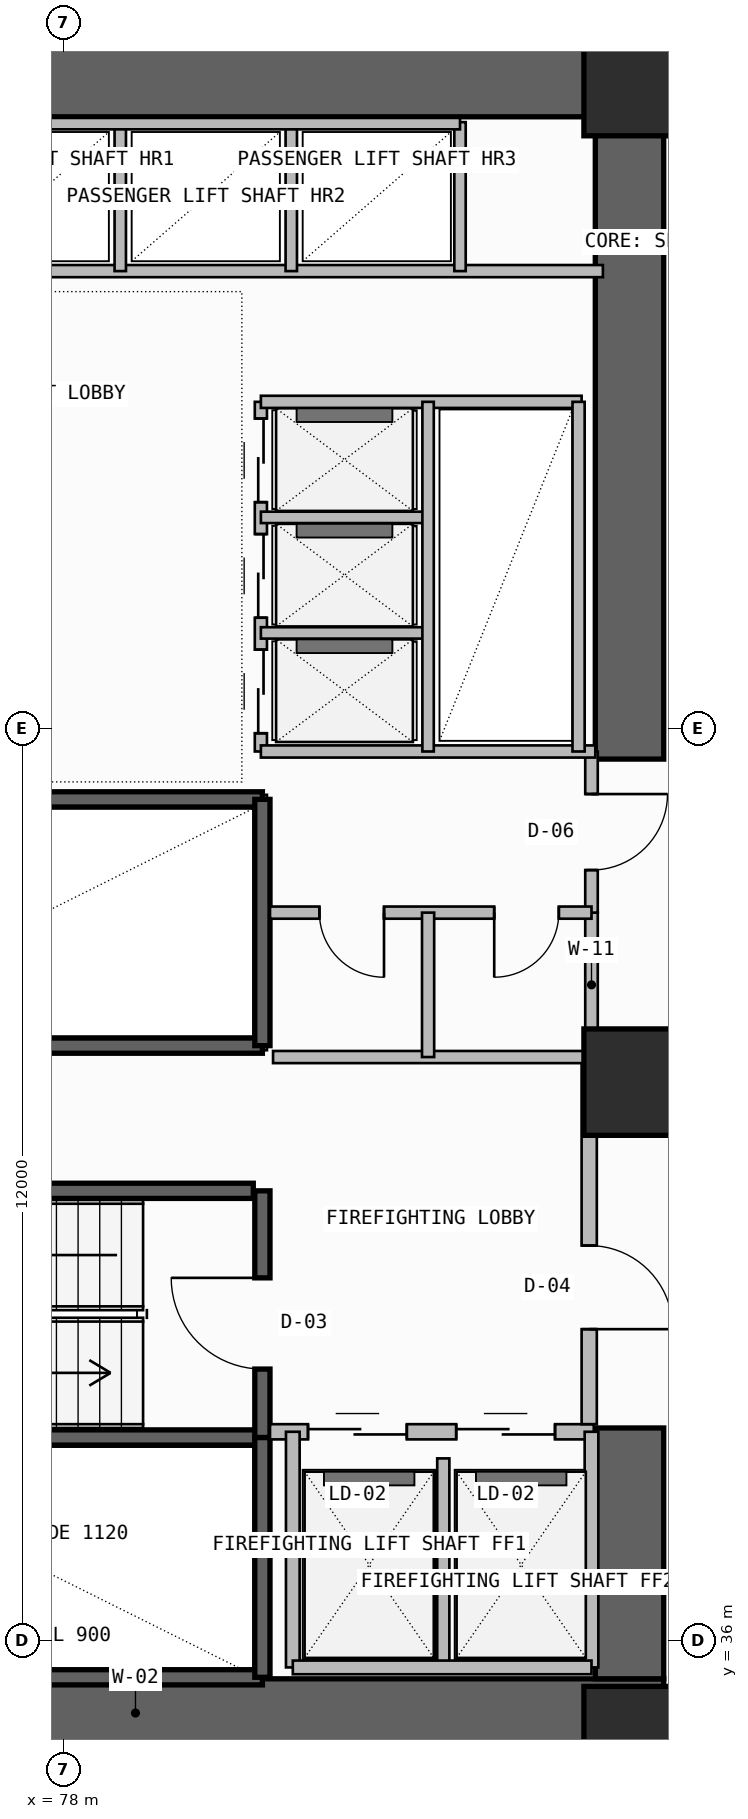
"""IFC4 building model, lengths in metres.
Left out: names, types, materials, properties, quantities, classifications, styles, units other than length and angle.
Written with IfcOpenShell. Run it as: python <this file> out.ifc"""

import sys

from ifc_helpers import new_model, si_unit, direction, frame, frame_2d, origin, origin_2d, place, context, subcontext, project, spatial, rectangle, extrude, element, fill, save


model = new_model("IFC4")
c1 = context("Model", 3, precision=1e-05, world=origin(), true_north=direction((0.0, 1.0)))
c2 = subcontext(c1, "Body", "Model", "MODEL_VIEW")
j1 = project(units=[si_unit("LENGTHUNIT", "METRE"), si_unit("PLANEANGLEUNIT", "RADIAN")], contexts=[c1])
p1 = place(None, origin())
s1 = spatial("IfcSite", under=j1, at=p1, CompositionType="ELEMENT")
p2 = place(p1, origin())
s2 = spatial("IfcBuilding", under=s1, at=p2, CompositionType="ELEMENT")
p3 = place(p2, frame((0.0, 0.0, 110.1)))
s3 = spatial("IfcBuildingStorey", under=s2, at=p3, CompositionType="ELEMENT", Elevation=110.1)
p4 = place(p3, frame((72.0, 35.05, -0.26), z_axis=(0.0, 0.0, 1.0), x_axis=(1.0, 0.0, 0.0)))
e1 = element("IfcWall", 1, at=p4, inside=s3, PredefinedType="SHEAR", context=c2, shape_type="SweptSolid", body=[
    extrude(rectangle(XDim=13.9, YDim=0.9, at=frame_2d((6.95, 0.0))), origin(), (0.0, 0.0, 1.0), 3.6),
])
p5 = place(p3, frame((85.45, 35.5, -0.26), z_axis=(0.0, 0.0, 1.0), x_axis=(0.0, 1.0, 0.0)))
e2 = element("IfcWall", 2, at=p5, inside=s3, PredefinedType="SHEAR", context=c2, shape_type="SweptSolid", body=[
    extrude(rectangle(XDim=3.3, YDim=0.9, at=frame_2d((1.65, 0.0))), origin(), (0.0, 0.0, 1.0), 3.6),
])
p6 = place(p3, frame((72.0, 56.5, -0.26), z_axis=(0.0, 0.0, 1.0), x_axis=(1.0, 0.0, 0.0)))
e3 = element("IfcWall", 3, at=p6, inside=s3, PredefinedType="SHEAR", context=c2, shape_type="SweptSolid", body=[
    extrude(rectangle(XDim=13.9, YDim=0.9, at=frame_2d((6.95, 0.0))), origin(), (0.0, 0.0, 1.0), 3.6),
])
p7 = place(p3, frame((85.45, 47.6, -0.26), z_axis=(0.0, 0.0, 1.0), x_axis=(0.0, 1.0, 0.0)))
e4 = element("IfcWall", 4, at=p7, inside=s3, PredefinedType="SHEAR", context=c2, shape_type="SweptSolid", body=[
    extrude(rectangle(XDim=8.45, YDim=0.9, at=frame_2d((4.225, 0.0))), origin(), (0.0, 0.0, 1.0), 3.6),
])
for number, where, z_axis, x_axis in (
    (5, (85.55, 34.7, 0.0), (0.0, 0.0, 1.0), (1.0, 0.0, 0.0)),
    (6, (85.55, 43.35, 0.0), (0.0, 0.0, 1.0), (1.0, 0.0, 0.0)),
    (7, (85.55, 56.5, 0.0), (0.0, 0.0, 1.0), (1.0, 0.0, 0.0)),
):
    element("IfcColumn", number, at=place(p3, frame(where, z_axis=z_axis, x_axis=x_axis)), inside=s3, PredefinedType="COLUMN", context=c2, shape_type="SweptSolid", body=[
        extrude(rectangle(XDim=1.4, YDim=1.4, at=origin_2d()), origin(), (0.0, 0.0, 1.0), 3.6),
    ])
for number, where, z_axis, x_axis in (
    (8, (72.92, 35.52, -0.26), (0.0, 0.0, 1.0), (1.0, 0.0, 0.0)),
    (9, (72.92, 38.675, -0.26), (0.0, 0.0, 1.0), (1.0, 0.0, 0.0)),
):
    element("IfcWall", number, at=place(p3, frame(where, z_axis=z_axis, x_axis=x_axis)), inside=s3, PredefinedType="SOLIDWALL", context=c2, shape_type="SweptSolid", body=[
        extrude(rectangle(XDim=7.7, YDim=0.2, at=frame_2d((3.85, 0.0))), origin(), (0.0, 0.0, 1.0), 3.6),
    ])
p8 = place(p3, frame((80.62, 35.52, -0.26), z_axis=(0.0, 0.0, 1.0), x_axis=(0.0, 1.0, 0.0)))
e10 = element("IfcWall", 10, at=p8, inside=s3, PredefinedType="SOLIDWALL", context=c2, shape_type="SweptSolid", body=[
    extrude(rectangle(XDim=3.155, YDim=0.2, at=frame_2d((1.578, 0.0))), origin(), (0.0, 0.0, 1.0), 3.6),
])
p9 = place(p3, frame((80.62, 38.675, -0.26), z_axis=(0.0, 0.0, 1.0), x_axis=(0.0, 1.0, 0.0)))
e11 = element("IfcWall", 11, at=p9, inside=s3, PredefinedType="SOLIDWALL", context=c2, shape_type="SweptSolid", body=[
    extrude(rectangle(XDim=3.245, YDim=0.2, at=frame_2d((1.623, 0.0))), origin(), (0.0, 0.0, 1.0), 3.6),
])
p10 = place(p9, frame((0.9, 0.0, 0.26)))
e12 = element("IfcOpeningElement", 12, at=p10, cuts=e11, PredefinedType="OPENING", context=c2, shape_type="SweptSolid", body=[
    extrude(rectangle(XDim=1.2, YDim=2.2, at=frame_2d((0.6, 1.1))), frame((0.0, 0.11, 0.0), z_axis=(0.0, -1.0, 0.0), x_axis=(1.0, 0.0, 0.0)), (0.0, 0.0, 1.0), 0.22),
])
p11 = place(p3, frame((80.72, 38.75, 0.0), z_axis=(0.0, 0.0, 1.0), x_axis=(1.0, 0.0, 0.0)))
e13 = element("IfcWall", 13, at=p11, inside=s3, PredefinedType="SOLIDWALL", context=c2, shape_type="SweptSolid", body=[
    extrude(rectangle(XDim=4.26, YDim=0.2, at=frame_2d((2.13, 0.0))), origin(), (0.0, 0.0, 1.0), 3.34),
])
p12 = place(p11, frame((0.5, 0.0, 0.0)))
e14 = element("IfcOpeningElement", 14, at=p12, cuts=e13, PredefinedType="OPENING", context=c2, shape_type="SweptSolid", body=[
    extrude(rectangle(XDim=1.3, YDim=2.3, at=frame_2d((0.65, 1.15))), frame((0.0, 0.11, 0.0), z_axis=(0.0, -1.0, 0.0), x_axis=(1.0, 0.0, 0.0)), (0.0, 0.0, 1.0), 0.22),
])
p13 = place(p11, frame((2.45, 0.0, 0.0)))
e15 = element("IfcOpeningElement", 15, at=p13, cuts=e13, PredefinedType="OPENING", context=c2, shape_type="SweptSolid", body=[
    extrude(rectangle(XDim=1.3, YDim=2.3, at=frame_2d((0.65, 1.15))), frame((0.0, 0.11, 0.0), z_axis=(0.0, -1.0, 0.0), x_axis=(1.0, 0.0, 0.0)), (0.0, 0.0, 1.0), 0.22),
])
p14 = place(p3, frame((83.0, 35.65, 0.0), z_axis=(0.0, 0.0, 1.0), x_axis=(0.0, 1.0, 0.0)))
e16 = element("IfcWall", 16, at=p14, inside=s3, PredefinedType="PLUMBINGWALL", context=c2, shape_type="SweptSolid", body=[
    extrude(rectangle(XDim=2.75, YDim=0.16, at=frame_2d((1.375, 0.0))), origin(), (0.0, 0.0, 1.0), 3.34),
])
for number, where, z_axis, x_axis in (
    (17, (84.95, 35.65, 0.0), (0.0, 0.0, 1.0), (0.0, 1.0, 0.0)),
    (18, (81.02, 35.65, 0.0), (0.0, 0.0, 1.0), (0.0, 1.0, 0.0)),
):
    element("IfcWall", number, at=place(p3, frame(where, z_axis=z_axis, x_axis=x_axis)), inside=s3, PredefinedType="SOLIDWALL", context=c2, shape_type="SweptSolid", body=[
        extrude(rectangle(XDim=3.1, YDim=0.18, at=frame_2d((1.55, 0.0))), origin(), (0.0, 0.0, 1.0), 3.34),
    ])
p15 = place(p3, frame((81.02, 35.65, 0.0), z_axis=(0.0, 0.0, 1.0), x_axis=(1.0, 0.0, 0.0)))
e19 = element("IfcWall", 19, at=p15, inside=s3, PredefinedType="SOLIDWALL", context=c2, shape_type="SweptSolid", body=[
    extrude(rectangle(XDim=3.93, YDim=0.18, at=frame_2d((1.965, 0.0))), origin(), (0.0, 0.0, 1.0), 3.34),
])
p16 = place(p3, frame((84.92, 38.85, 0.0), z_axis=(0.0, 0.0, 1.0), x_axis=(0.0, 1.0, 0.0)))
e20 = element("IfcWall", 20, at=p16, inside=s3, PredefinedType="SOLIDWALL", context=c2, shape_type="SweptSolid", body=[
    extrude(rectangle(XDim=4.83, YDim=0.2, at=frame_2d((2.415, 0.0))), origin(), (0.0, 0.0, 1.0), 3.34),
])
p17 = place(p16, frame((1.25, 0.0, 0.0)))
e21 = element("IfcOpeningElement", 21, at=p17, cuts=e20, PredefinedType="OPENING", context=c2, shape_type="SweptSolid", body=[
    extrude(rectangle(XDim=1.1, YDim=2.2, at=frame_2d((0.55, 1.1))), frame((0.0, 0.11, 0.0), z_axis=(0.0, -1.0, 0.0), x_axis=(1.0, 0.0, 0.0)), (0.0, 0.0, 1.0), 0.22),
])
p18 = place(p3, frame((72.92, 41.92, -0.26), z_axis=(0.0, 0.0, 1.0), x_axis=(1.0, 0.0, 0.0)))
e22 = element("IfcWall", 22, at=p18, inside=s3, PredefinedType="SOLIDWALL", context=c2, shape_type="SweptSolid", body=[
    extrude(rectangle(XDim=7.58, YDim=0.2, at=frame_2d((3.79, 0.0))), origin(), (0.0, 0.0, 1.0), 3.6),
])
for number, where, z_axis, x_axis in (
    (23, (72.92, 43.83, -0.26), (0.0, 0.0, 1.0), (1.0, 0.0, 0.0)),
    (24, (72.92, 47.07, -0.26), (0.0, 0.0, 1.0), (1.0, 0.0, 0.0)),
):
    element("IfcWall", number, at=place(p3, frame(where, z_axis=z_axis, x_axis=x_axis)), inside=s3, PredefinedType="SOLIDWALL", context=c2, shape_type="SweptSolid", body=[
        extrude(rectangle(XDim=7.7, YDim=0.2, at=frame_2d((3.85, 0.0))), origin(), (0.0, 0.0, 1.0), 3.6),
    ])
p19 = place(p3, frame((80.62, 43.83, -0.26), z_axis=(0.0, 0.0, 1.0), x_axis=(0.0, 1.0, 0.0)))
e25 = element("IfcWall", 25, at=p19, inside=s3, PredefinedType="SOLIDWALL", context=c2, shape_type="SweptSolid", body=[
    extrude(rectangle(XDim=3.24, YDim=0.2, at=frame_2d((1.62, 0.0))), origin(), (0.0, 0.0, 1.0), 3.6),
])
p20 = place(p3, frame((84.95, 43.68, 0.0), z_axis=(0.0, 0.0, 1.0), x_axis=(0.0, 1.0, 0.0)))
e26 = element("IfcWall", 26, at=p20, inside=s3, PredefinedType="PLUMBINGWALL", context=c2, shape_type="SweptSolid", body=[
    extrude(rectangle(XDim=1.9, YDim=0.165, at=frame_2d((0.95, 0.0))), origin(), (0.0, 0.0, 1.0), 3.34),
])
p21 = place(p3, frame((84.95, 45.58, 0.0), z_axis=(0.0, 0.0, 1.0), x_axis=(0.0, 1.0, 0.0)))
e27 = element("IfcWall", 27, at=p21, inside=s3, PredefinedType="PARTITIONING", context=c2, shape_type="SweptSolid", body=[
    extrude(rectangle(XDim=2.12, YDim=0.165, at=frame_2d((1.06, 0.0))), origin(), (0.0, 0.0, 1.0), 3.34),
])
p22 = place(p21, frame((0.56, 0.0, 0.0)))
e28 = element("IfcOpeningElement", 28, at=p22, cuts=e27, PredefinedType="OPENING", context=c2, shape_type="SweptSolid", body=[
    extrude(rectangle(XDim=1.0, YDim=2.2, at=frame_2d((0.5, 1.1))), frame((0.0, 0.093, 0.0), z_axis=(0.0, -1.0, 0.0), x_axis=(1.0, 0.0, 0.0)), (0.0, 0.0, 1.0), 0.185),
])
p23 = place(p3, frame((80.72, 45.58, 0.0), z_axis=(0.0, 0.0, 1.0), x_axis=(1.0, 0.0, 0.0)))
e29 = element("IfcWall", 29, at=p23, inside=s3, PredefinedType="PLUMBINGWALL", context=c2, shape_type="SweptSolid", body=[
    extrude(rectangle(XDim=4.23, YDim=0.16, at=frame_2d((2.115, 0.0))), origin(), (0.0, 0.0, 1.0), 3.34),
])
p24 = place(p23, frame((0.65, 0.0, 0.0)))
e30 = element("IfcOpeningElement", 30, at=p24, cuts=e29, PredefinedType="OPENING", context=c2, shape_type="SweptSolid", body=[
    extrude(rectangle(XDim=0.85, YDim=2.05, at=frame_2d((0.425, 1.025))), frame((0.0, 0.09, 0.0), z_axis=(0.0, -1.0, 0.0), x_axis=(1.0, 0.0, 0.0)), (0.0, 0.0, 1.0), 0.18),
])
p25 = place(p23, frame((2.95, 0.0, 0.0)))
e31 = element("IfcOpeningElement", 31, at=p25, cuts=e29, PredefinedType="OPENING", context=c2, shape_type="SweptSolid", body=[
    extrude(rectangle(XDim=0.85, YDim=2.05, at=frame_2d((0.425, 1.025))), frame((0.0, 0.09, 0.0), z_axis=(0.0, -1.0, 0.0), x_axis=(1.0, 0.0, 0.0)), (0.0, 0.0, 1.0), 0.18),
])
p26 = place(p3, frame((80.76, 43.68, 0.0), z_axis=(0.0, 0.0, 1.0), x_axis=(1.0, 0.0, 0.0)))
e32 = element("IfcWall", 32, at=p26, inside=s3, PredefinedType="PLUMBINGWALL", context=c2, shape_type="SweptSolid", body=[
    extrude(rectangle(XDim=4.19, YDim=0.16, at=frame_2d((2.095, 0.0))), origin(), (0.0, 0.0, 1.0), 3.34),
])
p27 = place(p3, frame((82.8, 43.68, 0.0), z_axis=(0.0, 0.0, 1.0), x_axis=(0.0, 1.0, 0.0)))
e33 = element("IfcWall", 33, at=p27, inside=s3, PredefinedType="PLUMBINGWALL", context=c2, shape_type="SweptSolid", body=[
    extrude(rectangle(XDim=1.9, YDim=0.16, at=frame_2d((0.95, 0.0))), origin(), (0.0, 0.0, 1.0), 3.34),
])
p28 = place(p3, frame((80.6, 47.7, 0.0), z_axis=(0.0, 0.0, 1.0), x_axis=(0.0, 1.0, 0.0)))
e34 = element("IfcWall", 34, at=p28, inside=s3, PredefinedType="SOLIDWALL", context=c2, shape_type="SweptSolid", body=[
    extrude(rectangle(XDim=4.6, YDim=0.16, at=frame_2d((2.3, 0.0))), origin(), (0.0, 0.0, 1.0), 3.34),
])
p29 = place(p28, frame((0.24, 0.0, 0.0)))
e35 = element("IfcOpeningElement", 35, at=p29, cuts=e34, PredefinedType="OPENING", context=c2, shape_type="SweptSolid", body=[
    extrude(rectangle(XDim=1.1, YDim=2.25, at=frame_2d((0.55, 1.125))), frame((0.0, 0.09, 0.0), z_axis=(0.0, -1.0, 0.0), x_axis=(1.0, 0.0, 0.0)), (0.0, 0.0, 1.0), 0.18),
])
p30 = place(p28, frame((1.76, 0.0, 0.0)))
e36 = element("IfcOpeningElement", 36, at=p30, cuts=e34, PredefinedType="OPENING", context=c2, shape_type="SweptSolid", body=[
    extrude(rectangle(XDim=1.1, YDim=2.25, at=frame_2d((0.55, 1.125))), frame((0.0, 0.09, 0.0), z_axis=(0.0, -1.0, 0.0), x_axis=(1.0, 0.0, 0.0)), (0.0, 0.0, 1.0), 0.18),
])
p31 = place(p28, frame((3.28, 0.0, 0.0)))
e37 = element("IfcOpeningElement", 37, at=p31, cuts=e34, PredefinedType="OPENING", context=c2, shape_type="SweptSolid", body=[
    extrude(rectangle(XDim=1.1, YDim=2.25, at=frame_2d((0.55, 1.125))), frame((0.0, 0.09, 0.0), z_axis=(0.0, -1.0, 0.0), x_axis=(1.0, 0.0, 0.0)), (0.0, 0.0, 1.0), 0.18),
])
p32 = place(p3, frame((80.6, 47.7, 0.0), z_axis=(0.0, 0.0, 1.0), x_axis=(1.0, 0.0, 0.0)))
e38 = element("IfcWall", 38, at=p32, inside=s3, PredefinedType="SOLIDWALL", context=c2, shape_type="SweptSolid", body=[
    extrude(rectangle(XDim=4.4, YDim=0.16, at=frame_2d((2.2, 0.0))), origin(), (0.0, 0.0, 1.0), 3.34),
])
p33 = place(p3, frame((80.6, 52.3, 0.0), z_axis=(0.0, 0.0, 1.0), x_axis=(1.0, 0.0, 0.0)))
e39 = element("IfcWall", 39, at=p33, inside=s3, PredefinedType="SOLIDWALL", context=c2, shape_type="SweptSolid", body=[
    extrude(rectangle(XDim=4.22, YDim=0.16, at=frame_2d((2.11, 0.0))), origin(), (0.0, 0.0, 1.0), 3.34),
])
for number, where, z_axis, x_axis in (
    (40, (80.6, 49.26, 0.0), (0.0, 0.0, 1.0), (1.0, 0.0, 0.0)),
    (41, (80.6, 50.78, 0.0), (0.0, 0.0, 1.0), (1.0, 0.0, 0.0)),
):
    element("IfcWall", number, at=place(p3, frame(where, z_axis=z_axis, x_axis=x_axis)), inside=s3, PredefinedType="PLUMBINGWALL", context=c2, shape_type="SweptSolid", body=[
        extrude(rectangle(XDim=2.2, YDim=0.15, at=frame_2d((1.1, 0.0))), origin(), (0.0, 0.0, 1.0), 3.34),
    ])
p34 = place(p3, frame((82.8, 47.7, 0.0), z_axis=(0.0, 0.0, 1.0), x_axis=(0.0, 1.0, 0.0)))
e42 = element("IfcWall", 42, at=p34, inside=s3, PredefinedType="PLUMBINGWALL", context=c2, shape_type="SweptSolid", body=[
    extrude(rectangle(XDim=4.6, YDim=0.15, at=frame_2d((2.3, 0.0))), origin(), (0.0, 0.0, 1.0), 3.34),
])
p35 = place(p3, frame((84.78, 47.7, 0.0), z_axis=(0.0, 0.0, 1.0), x_axis=(0.0, 1.0, 0.0)))
e43 = element("IfcWall", 43, at=p35, inside=s3, PredefinedType="SOLIDWALL", context=c2, shape_type="SweptSolid", body=[
    extrude(rectangle(XDim=4.6, YDim=0.16, at=frame_2d((2.3, 0.0))), origin(), (0.0, 0.0, 1.0), 3.34),
])
p36 = place(p3, frame((73.02, 54.02, 0.0), z_axis=(0.0, 0.0, 1.0), x_axis=(1.0, 0.0, 0.0)))
e44 = element("IfcWall", 44, at=p36, inside=s3, PredefinedType="SOLIDWALL", context=c2, shape_type="SweptSolid", body=[
    extrude(rectangle(XDim=12.08, YDim=0.16, at=frame_2d((6.04, 0.0))), origin(), (0.0, 0.0, 1.0), 3.34),
])
for number, where, z_axis, x_axis in (
    (45, (78.75, 54.02, 0.0), (0.0, 0.0, 1.0), (0.0, 1.0, 0.0)),
    (46, (81.0, 54.02, 0.0), (0.0, 0.0, 1.0), (0.0, 1.0, 0.0)),
):
    element("IfcWall", number, at=place(p3, frame(where, z_axis=z_axis, x_axis=x_axis)), inside=s3, PredefinedType="PLUMBINGWALL", context=c2, shape_type="SweptSolid", body=[
        extrude(rectangle(XDim=1.96, YDim=0.15, at=frame_2d((0.98, 0.0))), origin(), (0.0, 0.0, 1.0), 3.34),
    ])
p37 = place(p3, frame((83.22, 54.02, 0.0), z_axis=(0.0, 0.0, 1.0), x_axis=(0.0, 1.0, 0.0)))
e47 = element("IfcWall", 47, at=p37, inside=s3, PredefinedType="SOLIDWALL", context=c2, shape_type="SweptSolid", body=[
    extrude(rectangle(XDim=1.96, YDim=0.15, at=frame_2d((0.98, 0.0))), origin(), (0.0, 0.0, 1.0), 3.34),
])
p38 = place(p3, frame((76.52, 55.96, 0.0), z_axis=(0.0, 0.0, 1.0), x_axis=(1.0, 0.0, 0.0)))
e48 = element("IfcWall", 48, at=p38, inside=s3, PredefinedType="SOLIDWALL", context=c2, shape_type="SweptSolid", body=[
    extrude(rectangle(XDim=6.7, YDim=0.15, at=frame_2d((3.35, 0.0))), origin(), (0.0, 0.0, 1.0), 3.34),
])
p39 = place(p10, origin())
e49 = element("IfcDoor", 49, at=p39, inside=s3, OperationType="SINGLE_SWING_RIGHT", PredefinedType="USERDEFINED", context=c2, shape_type="SweptSolid", body=[
    extrude(rectangle(XDim=1.2, YDim=2.2, at=frame_2d((0.6, 1.1))), frame((0.0, 0.025, 0.0), z_axis=(0.0, -1.0, 0.0), x_axis=(1.0, 0.0, 0.0)), (0.0, 0.0, 1.0), 0.05),
])
fill(e12, e49)
p40 = place(p12, origin())
e50 = element("IfcDoor", 50, at=p40, inside=s3, OperationType="DOUBLE_DOOR_SLIDING", PredefinedType="DOOR", context=c2, shape_type="SweptSolid", body=[
    extrude(rectangle(XDim=1.3, YDim=2.3, at=frame_2d((0.65, 1.15))), frame((0.0, 0.025, 0.0), z_axis=(0.0, -1.0, 0.0), x_axis=(1.0, 0.0, 0.0)), (0.0, 0.0, 1.0), 0.05),
])
fill(e14, e50)
p41 = place(p13, origin())
e51 = element("IfcDoor", 51, at=p41, inside=s3, OperationType="DOUBLE_DOOR_SLIDING", PredefinedType="DOOR", context=c2, shape_type="SweptSolid", body=[
    extrude(rectangle(XDim=1.3, YDim=2.3, at=frame_2d((0.65, 1.15))), frame((0.0, 0.025, 0.0), z_axis=(0.0, -1.0, 0.0), x_axis=(1.0, 0.0, 0.0)), (0.0, 0.0, 1.0), 0.05),
])
fill(e15, e51)
p42 = place(p17, frame((1.1, 0.0, 0.0), z_axis=(0.0, 0.0, 1.0), x_axis=(-1.0, 0.0, 0.0)))
e52 = element("IfcDoor", 52, at=p42, inside=s3, OperationType="SINGLE_SWING_RIGHT", PredefinedType="DOOR", context=c2, shape_type="SweptSolid", body=[
    extrude(rectangle(XDim=1.1, YDim=2.2, at=frame_2d((0.55, 1.1))), frame((0.0, 0.025, 0.0), z_axis=(0.0, -1.0, 0.0), x_axis=(1.0, 0.0, 0.0)), (0.0, 0.0, 1.0), 0.05),
])
fill(e21, e52)
p43 = place(p22, frame((1.0, 0.0, 0.0), z_axis=(0.0, 0.0, 1.0), x_axis=(-1.0, 0.0, 0.0)))
e53 = element("IfcDoor", 53, at=p43, inside=s3, OperationType="SINGLE_SWING_LEFT", PredefinedType="DOOR", context=c2, shape_type="SweptSolid", body=[
    extrude(rectangle(XDim=1.0, YDim=2.2, at=frame_2d((0.5, 1.1))), frame((0.0, 0.025, 0.0), z_axis=(0.0, -1.0, 0.0), x_axis=(1.0, 0.0, 0.0)), (0.0, 0.0, 1.0), 0.05),
])
fill(e28, e53)
p44 = place(p24, frame((0.85, 0.0, 0.0), z_axis=(0.0, 0.0, 1.0), x_axis=(-1.0, 0.0, 0.0)))
e54 = element("IfcDoor", 54, at=p44, inside=s3, OperationType="SINGLE_SWING_LEFT", PredefinedType="DOOR", context=c2, shape_type="SweptSolid", body=[
    extrude(rectangle(XDim=0.85, YDim=2.05, at=frame_2d((0.425, 1.025))), frame((0.0, 0.025, 0.0), z_axis=(0.0, -1.0, 0.0), x_axis=(1.0, 0.0, 0.0)), (0.0, 0.0, 1.0), 0.05),
])
fill(e30, e54)
p45 = place(p25, frame((0.85, 0.0, 0.0), z_axis=(0.0, 0.0, 1.0), x_axis=(-1.0, 0.0, 0.0)))
e55 = element("IfcDoor", 55, at=p45, inside=s3, OperationType="SINGLE_SWING_RIGHT", PredefinedType="DOOR", context=c2, shape_type="SweptSolid", body=[
    extrude(rectangle(XDim=0.85, YDim=2.05, at=frame_2d((0.425, 1.025))), frame((0.0, 0.025, 0.0), z_axis=(0.0, -1.0, 0.0), x_axis=(1.0, 0.0, 0.0)), (0.0, 0.0, 1.0), 0.05),
])
fill(e31, e55)
p46 = place(p29, frame((1.1, 0.0, 0.0), z_axis=(0.0, 0.0, 1.0), x_axis=(-1.0, 0.0, 0.0)))
e56 = element("IfcDoor", 56, at=p46, inside=s3, OperationType="DOUBLE_DOOR_SLIDING", PredefinedType="DOOR", context=c2, shape_type="SweptSolid", body=[
    extrude(rectangle(XDim=1.1, YDim=2.25, at=frame_2d((0.55, 1.125))), frame((0.0, 0.025, 0.0), z_axis=(0.0, -1.0, 0.0), x_axis=(1.0, 0.0, 0.0)), (0.0, 0.0, 1.0), 0.05),
])
fill(e35, e56)
p47 = place(p30, frame((1.1, 0.0, 0.0), z_axis=(0.0, 0.0, 1.0), x_axis=(-1.0, 0.0, 0.0)))
e57 = element("IfcDoor", 57, at=p47, inside=s3, OperationType="DOUBLE_DOOR_SLIDING", PredefinedType="DOOR", context=c2, shape_type="SweptSolid", body=[
    extrude(rectangle(XDim=1.1, YDim=2.25, at=frame_2d((0.55, 1.125))), frame((0.0, 0.025, 0.0), z_axis=(0.0, -1.0, 0.0), x_axis=(1.0, 0.0, 0.0)), (0.0, 0.0, 1.0), 0.05),
])
fill(e36, e57)
p48 = place(p31, frame((1.1, 0.0, 0.0), z_axis=(0.0, 0.0, 1.0), x_axis=(-1.0, 0.0, 0.0)))
e58 = element("IfcDoor", 58, at=p48, inside=s3, OperationType="DOUBLE_DOOR_SLIDING", PredefinedType="DOOR", context=c2, shape_type="SweptSolid", body=[
    extrude(rectangle(XDim=1.1, YDim=2.25, at=frame_2d((0.55, 1.125))), frame((0.0, 0.025, 0.0), z_axis=(0.0, -1.0, 0.0), x_axis=(1.0, 0.0, 0.0)), (0.0, 0.0, 1.0), 0.05),
])
fill(e37, e58)
save(model, sys.argv[1])
